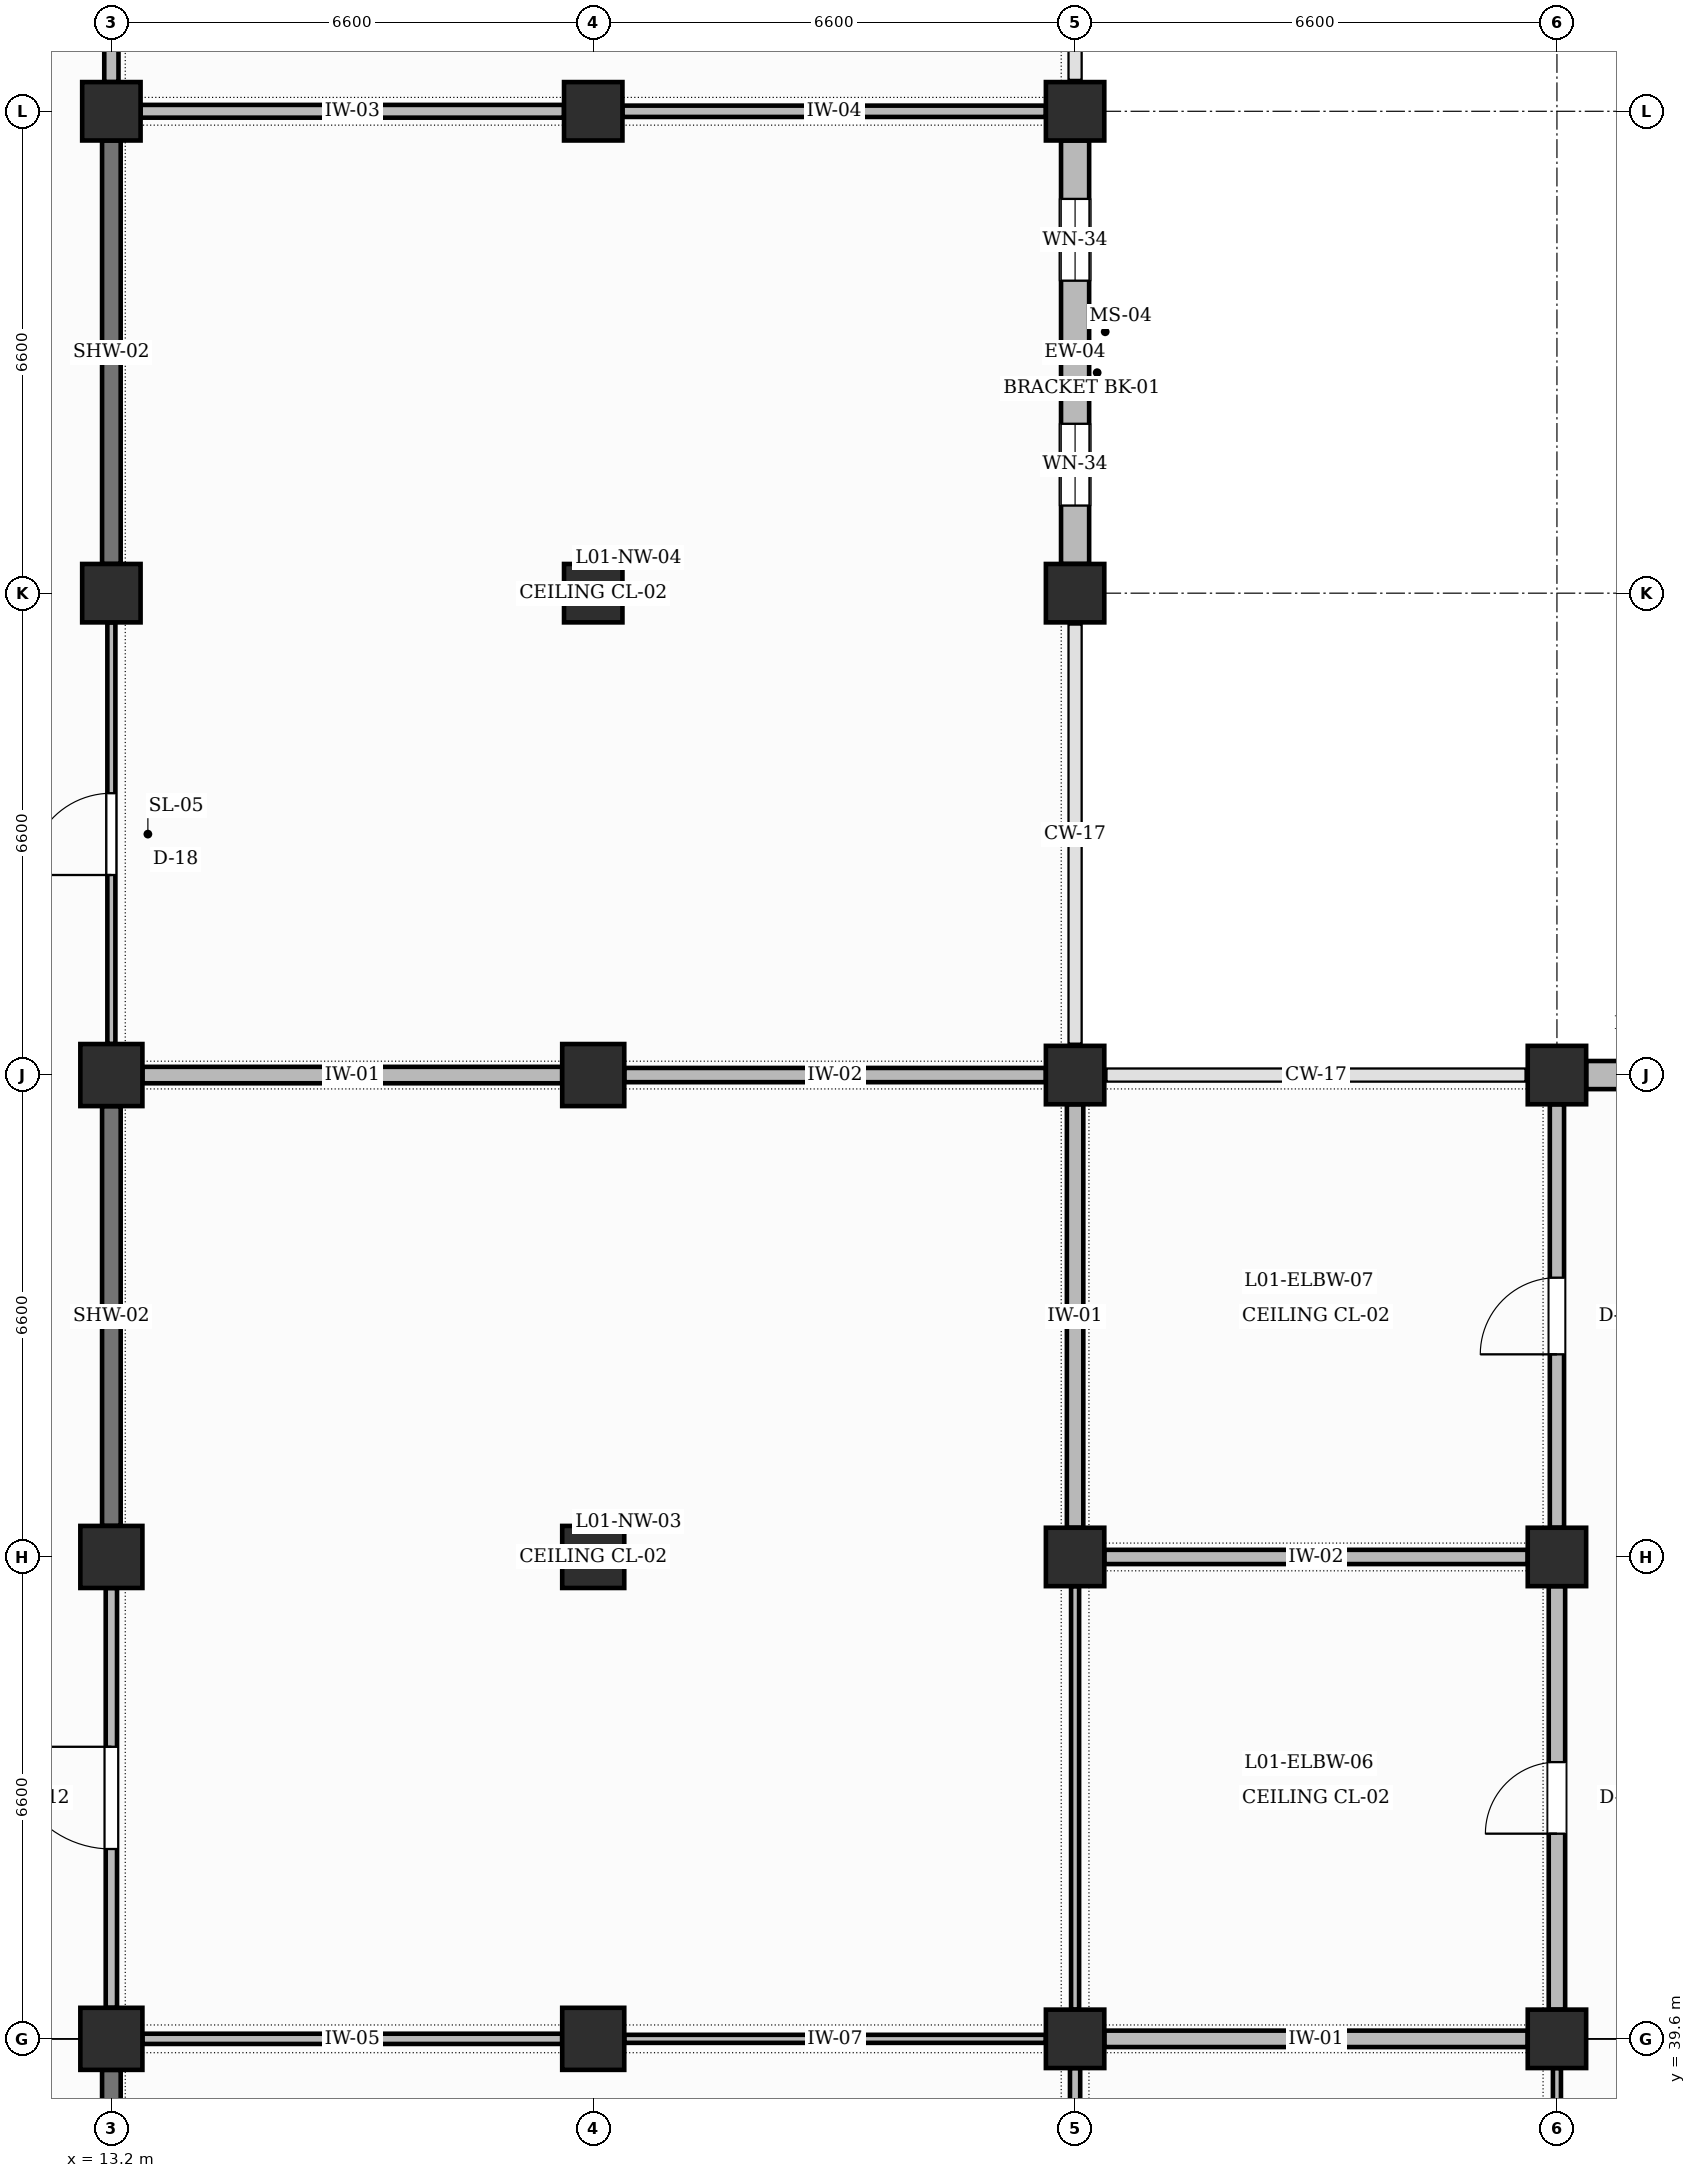
"""IFC4 building model, lengths in metres.
Left out: names, types, materials, properties, quantities, classifications, styles, units other than length and angle.
Written with IfcOpenShell. Run it as: python <this file> out.ifc"""

import sys

from ifc_helpers import new_model, si_unit, direction, frame, frame_2d, origin, origin_2d, place, context, subcontext, project, spatial, rectangle, extrude, element, fill, save


model = new_model("IFC4")
c1 = context("Model", 3, precision=1e-05, world=origin(), true_north=direction((0.0, 1.0)))
c2 = subcontext(c1, "Body", "Model", "MODEL_VIEW")
j1 = project(units=[si_unit("LENGTHUNIT", "METRE"), si_unit("PLANEANGLEUNIT", "RADIAN")], contexts=[c1])
p1 = place(None, origin())
s1 = spatial("IfcSite", under=j1, at=p1, CompositionType="ELEMENT")
p2 = place(p1, origin())
s2 = spatial("IfcBuilding", under=s1, at=p2, CompositionType="ELEMENT")
p3 = place(p2, frame((0.0, 0.0, 5.4)))
s3 = spatial("IfcBuildingStorey", under=s2, at=p3, CompositionType="ELEMENT", Elevation=5.4)
for number, where, z_axis, x_axis in (
    (1, (13.2, 39.6, 0.0), (0.0, 0.0, 1.0), (1.0, 0.0, 0.0)),
    (2, (13.2, 46.2, 0.0), (0.0, 0.0, 1.0), (1.0, 0.0, 0.0)),
    (3, (13.2, 52.8, 0.0), (0.0, 0.0, 1.0), (1.0, 0.0, 0.0)),
):
    element("IfcColumn", number, at=place(p3, frame(where, z_axis=z_axis, x_axis=x_axis)), inside=s3, PredefinedType="COLUMN", context=c2, shape_type="SweptSolid", body=[
        extrude(rectangle(XDim=0.85, YDim=0.85, at=origin_2d()), origin(), (0.0, 0.0, 1.0), 4.8),
    ])
for number, where, z_axis, x_axis in (
    (4, (13.2, 59.4, 0.0), (0.0, 0.0, 1.0), (1.0, 0.0, 0.0)),
    (5, (13.2, 66.0, 0.0), (0.0, 0.0, 1.0), (1.0, 0.0, 0.0)),
):
    element("IfcColumn", number, at=place(p3, frame(where, z_axis=z_axis, x_axis=x_axis)), inside=s3, PredefinedType="COLUMN", context=c2, shape_type="SweptSolid", body=[
        extrude(rectangle(XDim=0.8, YDim=0.8, at=origin_2d()), origin(), (0.0, 0.0, 1.0), 4.8),
    ])
for number, where, z_axis, x_axis in (
    (6, (19.8, 39.6, 0.0), (0.0, 0.0, 1.0), (1.0, 0.0, 0.0)),
    (7, (19.8, 46.2, 0.0), (0.0, 0.0, 1.0), (1.0, 0.0, 0.0)),
    (8, (19.8, 52.8, 0.0), (0.0, 0.0, 1.0), (1.0, 0.0, 0.0)),
):
    element("IfcColumn", number, at=place(p3, frame(where, z_axis=z_axis, x_axis=x_axis)), inside=s3, PredefinedType="COLUMN", context=c2, shape_type="SweptSolid", body=[
        extrude(rectangle(XDim=0.85, YDim=0.85, at=origin_2d()), origin(), (0.0, 0.0, 1.0), 4.8),
    ])
for number, where, z_axis, x_axis in (
    (9, (19.8, 59.4, 0.0), (0.0, 0.0, 1.0), (1.0, 0.0, 0.0)),
    (10, (19.8, 66.0, 0.0), (0.0, 0.0, 1.0), (1.0, 0.0, 0.0)),
    (11, (26.4, 39.6, 0.0), (0.0, 0.0, 1.0), (1.0, 0.0, 0.0)),
    (12, (26.4, 46.2, 0.0), (0.0, 0.0, 1.0), (1.0, 0.0, 0.0)),
    (13, (26.4, 52.8, 0.0), (0.0, 0.0, 1.0), (1.0, 0.0, 0.0)),
    (14, (26.4, 59.4, 0.0), (0.0, 0.0, 1.0), (1.0, 0.0, 0.0)),
    (15, (26.4, 66.0, 0.0), (0.0, 0.0, 1.0), (1.0, 0.0, 0.0)),
    (16, (33.0, 39.6, 0.0), (0.0, 0.0, 1.0), (1.0, 0.0, 0.0)),
    (17, (33.0, 46.2, 0.0), (0.0, 0.0, 1.0), (1.0, 0.0, 0.0)),
    (18, (33.0, 52.8, 0.0), (0.0, 0.0, 1.0), (1.0, 0.0, 0.0)),
):
    element("IfcColumn", number, at=place(p3, frame(where, z_axis=z_axis, x_axis=x_axis)), inside=s3, PredefinedType="COLUMN", context=c2, shape_type="SweptSolid", body=[
        extrude(rectangle(XDim=0.8, YDim=0.8, at=origin_2d()), origin(), (0.0, 0.0, 1.0), 4.8),
    ])
p4 = place(p3, frame((26.4, 59.8, 0.0), z_axis=(0.0, 0.0, 1.0), x_axis=(0.0, 1.0, 0.0)))
e19 = element("IfcWall", 19, at=p4, inside=s3, PredefinedType="SOLIDWALL", context=c2, shape_type="SweptSolid", body=[
    extrude(rectangle(XDim=5.8, YDim=0.385, at=frame_2d((2.9, 0.0))), origin(), (0.0, 0.0, 1.0), 3.85),
])
p5 = place(p4, frame((0.8, 0.0, 0.95)))
e20 = element("IfcOpeningElement", 20, at=p5, cuts=e19, PredefinedType="OPENING", context=c2, shape_type="SweptSolid", body=[
    extrude(rectangle(XDim=1.12, YDim=2.14, at=frame_2d((0.56, 1.07))), frame((0.0, 0.202, 0.0), z_axis=(0.0, -1.0, 0.0), x_axis=(1.0, 0.0, 0.0)), (0.0, 0.0, 1.0), 0.405),
])
p6 = place(p4, frame((3.88, 0.0, 0.95)))
e21 = element("IfcOpeningElement", 21, at=p6, cuts=e19, PredefinedType="OPENING", context=c2, shape_type="SweptSolid", body=[
    extrude(rectangle(XDim=1.12, YDim=2.14, at=frame_2d((0.56, 1.07))), frame((0.0, 0.202, 0.0), z_axis=(0.0, -1.0, 0.0), x_axis=(1.0, 0.0, 0.0)), (0.0, 0.0, 1.0), 0.405),
])
p7 = place(p3, frame((33.4, 52.8, 0.0), z_axis=(0.0, 0.0, 1.0), x_axis=(1.0, 0.0, 0.0)))
e22 = element("IfcWall", 22, at=p7, inside=s3, PredefinedType="SOLIDWALL", context=c2, shape_type="SweptSolid", body=[
    extrude(rectangle(XDim=5.8, YDim=0.385, at=frame_2d((2.9, 0.0))), origin(), (0.0, 0.0, 1.0), 3.85),
])
p8 = place(p7, frame((0.8, 0.0, 0.95)))
e23 = element("IfcOpeningElement", 23, at=p8, cuts=e22, PredefinedType="OPENING", context=c2, shape_type="SweptSolid", body=[
    extrude(rectangle(XDim=0.88, YDim=1.96, at=frame_2d((0.44, 0.98))), frame((0.0, 0.202, 0.0), z_axis=(0.0, -1.0, 0.0), x_axis=(1.0, 0.0, 0.0)), (0.0, 0.0, 1.0), 0.405),
])
p9 = place(p7, frame((4.12, 0.0, 0.95)))
e24 = element("IfcOpeningElement", 24, at=p9, cuts=e22, PredefinedType="OPENING", context=c2, shape_type="SweptSolid", body=[
    extrude(rectangle(XDim=0.88, YDim=1.96, at=frame_2d((0.44, 0.98))), frame((0.0, 0.202, 0.0), z_axis=(0.0, -1.0, 0.0), x_axis=(1.0, 0.0, 0.0)), (0.0, 0.0, 1.0), 0.405),
])
p10 = place(p3, frame((13.2, 33.425, 0.0), z_axis=(0.0, 0.0, 1.0), x_axis=(0.0, 1.0, 0.0)))
e25 = element("IfcWall", 25, at=p10, inside=s3, PredefinedType="SHEAR", context=c2, shape_type="SweptSolid", body=[
    extrude(rectangle(XDim=5.75, YDim=0.255, at=frame_2d((2.875, 0.0))), origin(), (0.0, 0.0, 1.0), 3.7),
])
p11 = place(p3, frame((13.2, 40.025, 0.0), z_axis=(0.0, 0.0, 1.0), x_axis=(0.0, 1.0, 0.0)))
e26 = element("IfcWall", 26, at=p11, inside=s3, PredefinedType="PARTITIONING", context=c2, shape_type="SweptSolid", body=[
    extrude(rectangle(XDim=5.75, YDim=0.155, at=frame_2d((2.875, 0.0))), origin(), (0.0, 0.0, 1.0), 3.7),
])
p12 = place(p11, frame((2.175, 0.0, 0.0)))
e27 = element("IfcOpeningElement", 27, at=p12, cuts=e26, PredefinedType="OPENING", context=c2, shape_type="SweptSolid", body=[
    extrude(rectangle(XDim=1.4, YDim=2.25, at=frame_2d((0.7, 1.125))), frame((0.0, 0.087, 0.0), z_axis=(0.0, -1.0, 0.0), x_axis=(1.0, 0.0, 0.0)), (0.0, 0.0, 1.0), 0.175),
])
p13 = place(p3, frame((13.2, 46.625, 0.0), z_axis=(0.0, 0.0, 1.0), x_axis=(0.0, 1.0, 0.0)))
e28 = element("IfcWall", 28, at=p13, inside=s3, PredefinedType="SHEAR", context=c2, shape_type="SweptSolid", body=[
    extrude(rectangle(XDim=5.75, YDim=0.255, at=frame_2d((2.875, 0.0))), origin(), (0.0, 0.0, 1.0), 3.7),
])
p14 = place(p3, frame((13.2, 53.225, 0.0), z_axis=(0.0, 0.0, 1.0), x_axis=(0.0, 1.0, 0.0)))
e29 = element("IfcWall", 29, at=p14, inside=s3, PredefinedType="PARTITIONING", context=c2, shape_type="SweptSolid", body=[
    extrude(rectangle(XDim=5.775, YDim=0.11, at=frame_2d((2.887, 0.0))), origin(), (0.0, 0.0, 1.0), 3.7),
])
p15 = place(p14, frame((2.315, 0.0, 0.0)))
e30 = element("IfcOpeningElement", 30, at=p15, cuts=e29, PredefinedType="OPENING", context=c2, shape_type="SweptSolid", body=[
    extrude(rectangle(XDim=1.12, YDim=2.2, at=frame_2d((0.56, 1.1))), frame((0.0, 0.065, 0.0), z_axis=(0.0, -1.0, 0.0), x_axis=(1.0, 0.0, 0.0)), (0.0, 0.0, 1.0), 0.13),
])
p16 = place(p3, frame((13.2, 59.8, 0.0), z_axis=(0.0, 0.0, 1.0), x_axis=(0.0, 1.0, 0.0)))
e31 = element("IfcWall", 31, at=p16, inside=s3, PredefinedType="SHEAR", context=c2, shape_type="SweptSolid", body=[
    extrude(rectangle(XDim=5.8, YDim=0.255, at=frame_2d((2.9, 0.0))), origin(), (0.0, 0.0, 1.0), 3.7),
])
p17 = place(p3, frame((13.2, 66.4, 0.0), z_axis=(0.0, 0.0, 1.0), x_axis=(0.0, 1.0, 0.0)))
e32 = element("IfcWall", 32, at=p17, inside=s3, PredefinedType="PARTITIONING", context=c2, shape_type="SweptSolid", body=[
    extrude(rectangle(XDim=5.8, YDim=0.195, at=frame_2d((2.9, 0.0))), origin(), (0.0, 0.0, 1.0), 3.7),
])
p18 = place(p17, frame((2.25, 0.0, 0.0)))
e33 = element("IfcOpeningElement", 33, at=p18, cuts=e32, PredefinedType="OPENING", context=c2, shape_type="SweptSolid", body=[
    extrude(rectangle(XDim=1.3, YDim=2.3, at=frame_2d((0.65, 1.15))), frame((0.0, 0.107, 0.0), z_axis=(0.0, -1.0, 0.0), x_axis=(1.0, 0.0, 0.0)), (0.0, 0.0, 1.0), 0.215),
])
p19 = place(p3, frame((13.625, 39.6, 0.0), z_axis=(0.0, 0.0, 1.0), x_axis=(1.0, 0.0, 0.0)))
e34 = element("IfcWall", 34, at=p19, inside=s3, PredefinedType="PARTITIONING", context=c2, shape_type="SweptSolid", body=[
    extrude(rectangle(XDim=5.75, YDim=0.14, at=frame_2d((2.875, 0.0))), origin(), (0.0, 0.0, 1.0), 3.6),
])
p20 = place(p3, frame((13.625, 52.8, 0.0), z_axis=(0.0, 0.0, 1.0), x_axis=(1.0, 0.0, 0.0)))
e35 = element("IfcWall", 35, at=p20, inside=s3, PredefinedType="PARTITIONING", context=c2, shape_type="SweptSolid", body=[
    extrude(rectangle(XDim=5.75, YDim=0.225, at=frame_2d((2.875, 0.0))), origin(), (0.0, 0.0, 1.0), 3.6),
])
p21 = place(p3, frame((13.6, 66.0, 0.0), z_axis=(0.0, 0.0, 1.0), x_axis=(1.0, 0.0, 0.0)))
e36 = element("IfcWall", 36, at=p21, inside=s3, PredefinedType="PARTITIONING", context=c2, shape_type="SweptSolid", body=[
    extrude(rectangle(XDim=5.8, YDim=0.175, at=frame_2d((2.9, 0.0))), origin(), (0.0, 0.0, 1.0), 3.6),
])
p22 = place(p3, frame((26.4, 33.4, 0.0), z_axis=(0.0, 0.0, 1.0), x_axis=(0.0, 1.0, 0.0)))
e37 = element("IfcWall", 37, at=p22, inside=s3, PredefinedType="PARTITIONING", context=c2, shape_type="SweptSolid", body=[
    extrude(rectangle(XDim=5.8, YDim=0.14, at=frame_2d((2.9, 0.0))), origin(), (0.0, 0.0, 1.0), 3.7),
])
p23 = place(p3, frame((20.225, 39.6, 0.0), z_axis=(0.0, 0.0, 1.0), x_axis=(1.0, 0.0, 0.0)))
e38 = element("IfcWall", 38, at=p23, inside=s3, PredefinedType="PARTITIONING", context=c2, shape_type="SweptSolid", body=[
    extrude(rectangle(XDim=5.775, YDim=0.11, at=frame_2d((2.887, 0.0))), origin(), (0.0, 0.0, 1.0), 3.7),
])
p24 = place(p3, frame((26.4, 40.0, 0.0), z_axis=(0.0, 0.0, 1.0), x_axis=(0.0, 1.0, 0.0)))
e39 = element("IfcWall", 39, at=p24, inside=s3, PredefinedType="PARTITIONING", context=c2, shape_type="SweptSolid", body=[
    extrude(rectangle(XDim=5.8, YDim=0.11, at=frame_2d((2.9, 0.0))), origin(), (0.0, 0.0, 1.0), 3.7),
])
p25 = place(p3, frame((26.4, 46.6, 0.0), z_axis=(0.0, 0.0, 1.0), x_axis=(0.0, 1.0, 0.0)))
e40 = element("IfcWall", 40, at=p25, inside=s3, PredefinedType="PARTITIONING", context=c2, shape_type="SweptSolid", body=[
    extrude(rectangle(XDim=5.8, YDim=0.225, at=frame_2d((2.9, 0.0))), origin(), (0.0, 0.0, 1.0), 3.7),
])
p26 = place(p3, frame((20.225, 52.8, 0.0), z_axis=(0.0, 0.0, 1.0), x_axis=(1.0, 0.0, 0.0)))
e41 = element("IfcWall", 41, at=p26, inside=s3, PredefinedType="PARTITIONING", context=c2, shape_type="SweptSolid", body=[
    extrude(rectangle(XDim=5.775, YDim=0.195, at=frame_2d((2.887, 0.0))), origin(), (0.0, 0.0, 1.0), 3.7),
])
p27 = place(p3, frame((20.2, 66.0, 0.0), z_axis=(0.0, 0.0, 1.0), x_axis=(1.0, 0.0, 0.0)))
e42 = element("IfcWall", 42, at=p27, inside=s3, PredefinedType="PARTITIONING", context=c2, shape_type="SweptSolid", body=[
    extrude(rectangle(XDim=5.8, YDim=0.155, at=frame_2d((2.9, 0.0))), origin(), (0.0, 0.0, 1.0), 4.0),
])
p28 = place(p3, frame((33.0, 33.4, 0.0), z_axis=(0.0, 0.0, 1.0), x_axis=(0.0, 1.0, 0.0)))
e43 = element("IfcWall", 43, at=p28, inside=s3, PredefinedType="PARTITIONING", context=c2, shape_type="SweptSolid", body=[
    extrude(rectangle(XDim=5.8, YDim=0.11, at=frame_2d((2.9, 0.0))), origin(), (0.0, 0.0, 1.0), 3.7),
])
p29 = place(p28, frame((2.31, 0.0, 0.0)))
e44 = element("IfcOpeningElement", 44, at=p29, cuts=e43, PredefinedType="OPENING", context=c2, shape_type="SweptSolid", body=[
    extrude(rectangle(XDim=1.18, YDim=2.2, at=frame_2d((0.59, 1.1))), frame((0.0, 0.065, 0.0), z_axis=(0.0, -1.0, 0.0), x_axis=(1.0, 0.0, 0.0)), (0.0, 0.0, 1.0), 0.13),
])
p30 = place(p3, frame((26.8, 39.6, 0.0), z_axis=(0.0, 0.0, 1.0), x_axis=(1.0, 0.0, 0.0)))
e45 = element("IfcWall", 45, at=p30, inside=s3, PredefinedType="PARTITIONING", context=c2, shape_type="SweptSolid", body=[
    extrude(rectangle(XDim=5.8, YDim=0.225, at=frame_2d((2.9, 0.0))), origin(), (0.0, 0.0, 1.0), 3.6),
])
p31 = place(p3, frame((33.0, 40.0, 0.0), z_axis=(0.0, 0.0, 1.0), x_axis=(0.0, 1.0, 0.0)))
e46 = element("IfcWall", 46, at=p31, inside=s3, PredefinedType="PARTITIONING", context=c2, shape_type="SweptSolid", body=[
    extrude(rectangle(XDim=5.8, YDim=0.225, at=frame_2d((2.9, 0.0))), origin(), (0.0, 0.0, 1.0), 3.7),
])
p32 = place(p31, frame((2.41, 0.0, 0.0)))
e47 = element("IfcOpeningElement", 47, at=p32, cuts=e46, PredefinedType="OPENING", context=c2, shape_type="SweptSolid", body=[
    extrude(rectangle(XDim=0.98, YDim=2.15, at=frame_2d((0.49, 1.075))), frame((0.0, 0.123, 0.0), z_axis=(0.0, -1.0, 0.0), x_axis=(1.0, 0.0, 0.0)), (0.0, 0.0, 1.0), 0.245),
])
p33 = place(p3, frame((26.8, 46.2, 0.0), z_axis=(0.0, 0.0, 1.0), x_axis=(1.0, 0.0, 0.0)))
e48 = element("IfcWall", 48, at=p33, inside=s3, PredefinedType="PARTITIONING", context=c2, shape_type="SweptSolid", body=[
    extrude(rectangle(XDim=5.8, YDim=0.195, at=frame_2d((2.9, 0.0))), origin(), (0.0, 0.0, 1.0), 3.7),
])
p34 = place(p3, frame((33.0, 46.6, 0.0), z_axis=(0.0, 0.0, 1.0), x_axis=(0.0, 1.0, 0.0)))
e49 = element("IfcWall", 49, at=p34, inside=s3, PredefinedType="PARTITIONING", context=c2, shape_type="SweptSolid", body=[
    extrude(rectangle(XDim=5.8, YDim=0.195, at=frame_2d((2.9, 0.0))), origin(), (0.0, 0.0, 1.0), 3.7),
])
p35 = place(p34, frame((2.375, 0.0, 0.0)))
e50 = element("IfcOpeningElement", 50, at=p35, cuts=e49, PredefinedType="OPENING", context=c2, shape_type="SweptSolid", body=[
    extrude(rectangle(XDim=1.05, YDim=2.15, at=frame_2d((0.525, 1.075))), frame((0.0, 0.107, 0.0), z_axis=(0.0, -1.0, 0.0), x_axis=(1.0, 0.0, 0.0)), (0.0, 0.0, 1.0), 0.215),
])
p36 = place(p5, origin())
e51 = element("IfcWindow", 51, at=p36, inside=s3, PartitioningType="SINGLE_PANEL", PredefinedType="WINDOW", context=c2, shape_type="SweptSolid", body=[
    extrude(rectangle(XDim=1.12, YDim=2.14, at=frame_2d((0.56, 1.07))), frame((0.0, 0.03, 0.0), z_axis=(0.0, -1.0, 0.0), x_axis=(1.0, 0.0, 0.0)), (0.0, 0.0, 1.0), 0.06),
])
fill(e20, e51)
p37 = place(p6, origin())
e52 = element("IfcWindow", 52, at=p37, inside=s3, PartitioningType="SINGLE_PANEL", PredefinedType="WINDOW", context=c2, shape_type="SweptSolid", body=[
    extrude(rectangle(XDim=1.12, YDim=2.14, at=frame_2d((0.56, 1.07))), frame((0.0, 0.03, 0.0), z_axis=(0.0, -1.0, 0.0), x_axis=(1.0, 0.0, 0.0)), (0.0, 0.0, 1.0), 0.06),
])
fill(e21, e52)
p38 = place(p32, origin())
e53 = element("IfcDoor", 53, at=p38, inside=s3, OperationType="SINGLE_SWING_LEFT", PredefinedType="DOOR", context=c2, shape_type="SweptSolid", body=[
    extrude(rectangle(XDim=0.98, YDim=2.15, at=frame_2d((0.49, 1.075))), frame((0.0, 0.025, 0.0), z_axis=(0.0, -1.0, 0.0), x_axis=(1.0, 0.0, 0.0)), (0.0, 0.0, 1.0), 0.05),
])
fill(e47, e53)
p39 = place(p35, origin())
e54 = element("IfcDoor", 54, at=p39, inside=s3, OperationType="SINGLE_SWING_LEFT", PredefinedType="DOOR", context=c2, shape_type="SweptSolid", body=[
    extrude(rectangle(XDim=1.05, YDim=2.15, at=frame_2d((0.525, 1.075))), frame((0.0, 0.025, 0.0), z_axis=(0.0, -1.0, 0.0), x_axis=(1.0, 0.0, 0.0)), (0.0, 0.0, 1.0), 0.05),
])
fill(e50, e54)
p40 = place(p12, origin())
e55 = element("IfcDoor", 55, at=p40, inside=s3, OperationType="SINGLE_SWING_RIGHT", PredefinedType="DOOR", context=c2, shape_type="SweptSolid", body=[
    extrude(rectangle(XDim=1.4, YDim=2.25, at=frame_2d((0.7, 1.125))), frame((0.0, 0.025, 0.0), z_axis=(0.0, -1.0, 0.0), x_axis=(1.0, 0.0, 0.0)), (0.0, 0.0, 1.0), 0.05),
])
fill(e27, e55)
p41 = place(p15, origin())
e56 = element("IfcDoor", 56, at=p41, inside=s3, OperationType="SINGLE_SWING_LEFT", PredefinedType="DOOR", context=c2, shape_type="SweptSolid", body=[
    extrude(rectangle(XDim=1.12, YDim=2.2, at=frame_2d((0.56, 1.1))), frame((0.0, 0.025, 0.0), z_axis=(0.0, -1.0, 0.0), x_axis=(1.0, 0.0, 0.0)), (0.0, 0.0, 1.0), 0.05),
])
fill(e30, e56)
save(model, sys.argv[1])
